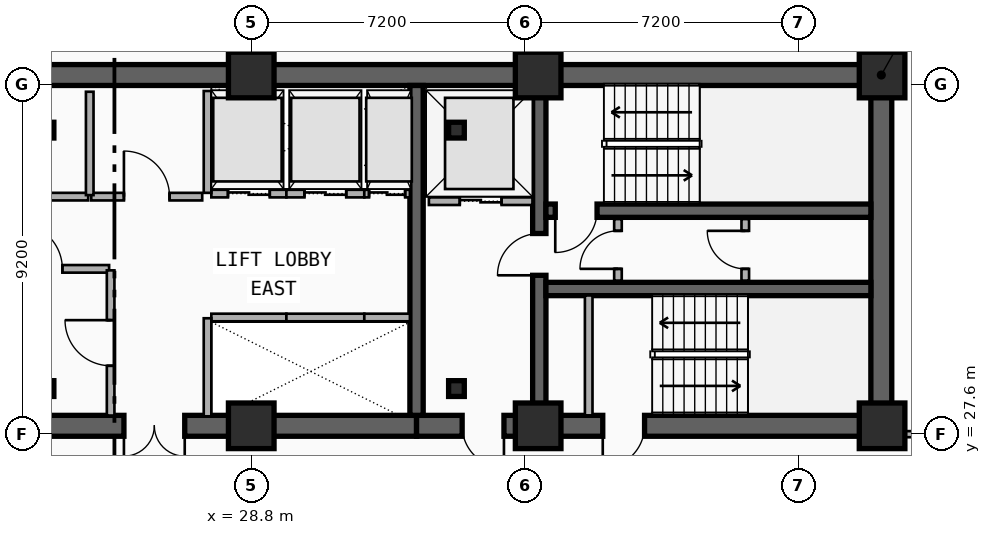
"""IFC4 building model, lengths in metres.
Left out: names, types, materials, properties, quantities, classifications, styles, units other than length and angle.
Written with IfcOpenShell. Run it as: python <this file> out.ifc"""

import sys

from ifc_helpers import new_model, si_unit, direction, frame, frame_2d, origin, origin_2d, place, context, subcontext, project, spatial, rectangle, i_section, extrude, element, fill, save


model = new_model("IFC4")
c1 = context("Model", 3, precision=1e-05, world=origin(), true_north=direction((0.0, 1.0)))
c2 = subcontext(c1, "Body", "Model", "MODEL_VIEW")
j1 = project(units=[si_unit("LENGTHUNIT", "METRE"), si_unit("PLANEANGLEUNIT", "RADIAN")], contexts=[c1])
p1 = place(None, origin())
s1 = spatial("IfcSite", under=j1, at=p1, CompositionType="ELEMENT")
p2 = place(p1, origin())
s2 = spatial("IfcBuilding", under=s1, at=p2, CompositionType="ELEMENT")
p3 = place(p2, frame((0.0, 0.0, 148.35)))
s3 = spatial("IfcBuildingStorey", under=s2, at=p3, CompositionType="ELEMENT", Elevation=148.35)
p4 = place(p3, frame((12.15, 37.05, 0.0), z_axis=(0.0, 0.0, 1.0), x_axis=(1.0, 0.0, 0.0)))
e1 = element("IfcWall", 1, at=p4, inside=s3, PredefinedType="SHEAR", context=c2, shape_type="SweptSolid", body=[
    extrude(rectangle(XDim=33.23, YDim=0.55, at=frame_2d((16.615, 0.0))), origin(), (0.0, 0.0, 1.0), 3.55),
])
p5 = place(p3, frame((33.15, 27.82, 0.0), z_axis=(0.0, 0.0, 1.0), x_axis=(-1.0, 0.0, 0.0)))
e2 = element("IfcWall", 2, at=p5, inside=s3, PredefinedType="SHEAR", context=c2, shape_type="SweptSolid", body=[
    extrude(rectangle(XDim=11.97, YDim=0.55, at=frame_2d((5.985, 0.0))), origin(), (0.0, 0.0, 1.0), 3.55),
])
p6 = place(p5, frame((6.1, 0.0, 0.0)))
e3 = element("IfcOpeningElement", 3, at=p6, cuts=e2, PredefinedType="OPENING", context=c2, shape_type="SweptSolid", body=[
    extrude(rectangle(XDim=1.6, YDim=2.2, at=frame_2d((0.8, 1.1))), frame((0.0, 0.285, 0.0), z_axis=(0.0, -1.0, 0.0), x_axis=(1.0, 0.0, 0.0)), (0.0, 0.0, 1.0), 0.57),
])
p7 = place(p3, frame((45.38, 27.82, 0.0), z_axis=(0.0, 0.0, 1.0), x_axis=(-1.0, 0.0, 0.0)))
e4 = element("IfcWall", 4, at=p7, inside=s3, PredefinedType="SHEAR", context=c2, shape_type="SweptSolid", body=[
    extrude(rectangle(XDim=12.23, YDim=0.55, at=frame_2d((6.115, 0.0))), origin(), (0.0, 0.0, 1.0), 3.55),
])
p8 = place(p7, frame((9.93, 0.0, 0.0)))
e5 = element("IfcOpeningElement", 5, at=p8, cuts=e4, PredefinedType="OPENING", context=c2, shape_type="SweptSolid", body=[
    extrude(rectangle(XDim=1.1, YDim=2.15, at=frame_2d((0.55, 1.075))), frame((0.0, 0.285, 0.0), z_axis=(0.0, -1.0, 0.0), x_axis=(1.0, 0.0, 0.0)), (0.0, 0.0, 1.0), 0.57),
])
p9 = place(p7, frame((6.23, 0.0, 0.0)))
e6 = element("IfcOpeningElement", 6, at=p9, cuts=e4, PredefinedType="OPENING", context=c2, shape_type="SweptSolid", body=[
    extrude(rectangle(XDim=1.1, YDim=2.15, at=frame_2d((0.55, 1.075))), frame((0.0, 0.285, 0.0), z_axis=(0.0, -1.0, 0.0), x_axis=(1.0, 0.0, 0.0)), (0.0, 0.0, 1.0), 0.57),
])
p10 = place(p3, frame((45.38, 28.095, 0.0), z_axis=(0.0, 0.0, 1.0), x_axis=(0.0, 1.0, 0.0)))
e7 = element("IfcWall", 7, at=p10, inside=s3, PredefinedType="SHEAR", context=c2, shape_type="SweptSolid", body=[
    extrude(rectangle(XDim=8.68, YDim=0.55, at=frame_2d((4.34, 0.0))), origin(), (0.0, 0.0, 1.0), 3.55),
])
p11 = place(p3, frame((33.15, 28.095, 0.0), z_axis=(0.0, 0.0, 1.0), x_axis=(0.0, 1.0, 0.0)))
e8 = element("IfcWall", 8, at=p11, inside=s3, PredefinedType="SHEAR", context=c2, shape_type="SweptSolid", body=[
    extrude(rectangle(XDim=8.68, YDim=0.35, at=frame_2d((4.34, 0.0))), origin(), (0.0, 0.0, 1.0), 3.55),
])
p12 = place(p3, frame((36.38, 28.095, 0.0), z_axis=(0.0, 0.0, 1.0), x_axis=(0.0, 1.0, 0.0)))
e9 = element("IfcWall", 9, at=p12, inside=s3, PredefinedType="SHEAR", context=c2, shape_type="SweptSolid", body=[
    extrude(rectangle(XDim=8.68, YDim=0.35, at=frame_2d((4.34, 0.0))), origin(), (0.0, 0.0, 1.0), 3.55),
])
p13 = place(p12, frame((3.685, 0.0, 0.0)))
e10 = element("IfcOpeningElement", 10, at=p13, cuts=e9, PredefinedType="OPENING", context=c2, shape_type="SweptSolid", body=[
    extrude(rectangle(XDim=1.1, YDim=2.15, at=frame_2d((0.55, 1.075))), frame((0.0, 0.185, 0.0), z_axis=(0.0, -1.0, 0.0), x_axis=(1.0, 0.0, 0.0)), (0.0, 0.0, 1.0), 0.37),
])
p14 = place(p3, frame((45.105, 33.48, 0.0), z_axis=(0.0, 0.0, 1.0), x_axis=(-1.0, 0.0, 0.0)))
e11 = element("IfcWall", 11, at=p14, inside=s3, PredefinedType="SHEAR", context=c2, shape_type="SweptSolid", body=[
    extrude(rectangle(XDim=8.55, YDim=0.35, at=frame_2d((4.275, 0.0))), origin(), (0.0, 0.0, 1.0), 3.55),
])
p15 = place(p14, frame((7.205, 0.0, 0.0)))
e12 = element("IfcOpeningElement", 12, at=p15, cuts=e11, PredefinedType="OPENING", context=c2, shape_type="SweptSolid", body=[
    extrude(rectangle(XDim=1.1, YDim=2.15, at=frame_2d((0.55, 1.075))), frame((0.0, 0.185, 0.0), z_axis=(0.0, -1.0, 0.0), x_axis=(1.0, 0.0, 0.0)), (0.0, 0.0, 1.0), 0.37),
])
p16 = place(p3, frame((36.555, 31.42, 0.0), z_axis=(0.0, 0.0, 1.0), x_axis=(1.0, 0.0, 0.0)))
e13 = element("IfcWall", 13, at=p16, inside=s3, PredefinedType="SHEAR", context=c2, shape_type="SweptSolid", body=[
    extrude(rectangle(XDim=8.55, YDim=0.35, at=frame_2d((4.275, 0.0))), origin(), (0.0, 0.0, 1.0), 3.55),
])
for number, where, z_axis, x_axis in (
    (14, (23.4, 28.8, 0.0), (0.0, 0.0, 1.0), (1.0, 0.0, 0.0)),
    (15, (34.2, 28.8, 0.0), (0.0, 0.0, 1.0), (1.0, 0.0, 0.0)),
    (16, (34.2, 35.6, 0.0), (0.0, 0.0, 1.0), (1.0, 0.0, 0.0)),
    (17, (23.4, 35.6, 0.0), (0.0, 0.0, 1.0), (1.0, 0.0, 0.0)),
):
    element("IfcColumn", number, at=place(p3, frame(where, z_axis=z_axis, x_axis=x_axis)), inside=s3, PredefinedType="COLUMN", context=c2, shape_type="SweptSolid", body=[
        extrude(i_section(OverallWidth=0.413, OverallDepth=0.415, WebThickness=0.03, FlangeThickness=0.047, FilletRadius=0.015, at=origin_2d()), origin(), (0.0, 0.0, 1.0), 3.55),
    ])
for number, where, z_axis, x_axis in (
    (18, (28.8, 27.82, 0.0), (0.0, 0.0, 1.0), (1.0, 0.0, 0.0)),
    (19, (28.8, 37.05, 0.0), (0.0, 0.0, 1.0), (1.0, 0.0, 0.0)),
    (20, (36.35, 27.82, 0.0), (0.0, 0.0, 1.0), (1.0, 0.0, 0.0)),
    (21, (36.35, 37.05, 0.0), (0.0, 0.0, 1.0), (1.0, 0.0, 0.0)),
    (22, (45.4, 27.82, 0.0), (0.0, 0.0, 1.0), (1.0, 0.0, 0.0)),
    (23, (45.4, 37.05, 0.0), (0.0, 0.0, 1.0), (1.0, 0.0, 0.0)),
):
    element("IfcColumn", number, at=place(p3, frame(where, z_axis=z_axis, x_axis=x_axis)), inside=s3, PredefinedType="COLUMN", context=c2, shape_type="SweptSolid", body=[
        extrude(rectangle(XDim=1.2, YDim=1.2, at=origin_2d()), origin(), (0.0, 0.0, 1.0), 3.55),
    ])
p17 = place(p3, frame((33.475, 33.73, 0.0), z_axis=(0.0, 0.0, 1.0), x_axis=(1.0, 0.0, 0.0)))
e24 = element("IfcWall", 24, at=p17, inside=s3, PredefinedType="PARTITIONING", context=c2, shape_type="SweptSolid", body=[
    extrude(rectangle(XDim=2.725, YDim=0.2, at=frame_2d((1.362, 0.0))), origin(), (0.0, 0.0, 1.0), 2.36),
])
p18 = place(p17, frame((0.812, 0.0, 0.0)))
e25 = element("IfcOpeningElement", 25, at=p18, cuts=e24, PredefinedType="OPENING", context=c2, shape_type="SweptSolid", body=[
    extrude(rectangle(XDim=1.1, YDim=2.15, at=frame_2d((0.55, 1.075))), frame((0.0, 0.11, 0.0), z_axis=(0.0, -1.0, 0.0), x_axis=(1.0, 0.0, 0.0)), (0.0, 0.0, 1.0), 0.22),
])
p19 = place(p3, frame((27.75, 30.67, 0.0), z_axis=(0.0, 0.0, 1.0), x_axis=(1.0, 0.0, 0.0)))
e26 = element("IfcWall", 26, at=p19, inside=s3, PredefinedType="PARTITIONING", context=c2, shape_type="SweptSolid", body=[
    extrude(rectangle(XDim=1.975, YDim=0.2, at=frame_2d((0.988, 0.0))), origin(), (0.0, 0.0, 1.0), 2.36),
])
p20 = place(p3, frame((27.65, 28.07, 0.0), z_axis=(0.0, 0.0, 1.0), x_axis=(0.0, 1.0, 0.0)))
e27 = element("IfcWall", 27, at=p20, inside=s3, PredefinedType="PARTITIONING", context=c2, shape_type="SweptSolid", body=[
    extrude(rectangle(XDim=2.58, YDim=0.2, at=frame_2d((1.29, 0.0))), origin(), (0.0, 0.0, 1.0), 2.36),
])
p21 = place(p3, frame((29.725, 30.67, 0.0), z_axis=(0.0, 0.0, 1.0), x_axis=(1.0, 0.0, 0.0)))
e28 = element("IfcWall", 28, at=p21, inside=s3, PredefinedType="PARTITIONING", context=c2, shape_type="SweptSolid", body=[
    extrude(rectangle(XDim=2.05, YDim=0.2, at=frame_2d((1.025, 0.0))), origin(), (0.0, 0.0, 1.0), 2.67),
])
p22 = place(p3, frame((31.775, 30.67, 0.0), z_axis=(0.0, 0.0, 1.0), x_axis=(1.0, 0.0, 0.0)))
e29 = element("IfcWall", 29, at=p22, inside=s3, PredefinedType="PARTITIONING", context=c2, shape_type="SweptSolid", body=[
    extrude(rectangle(XDim=1.2, YDim=0.2, at=frame_2d((0.6, 0.0))), origin(), (0.0, 0.0, 1.0), 2.67),
])
p23 = place(p3, frame((27.75, 33.93, 0.0), z_axis=(0.0, 0.0, 1.0), x_axis=(1.0, 0.0, 0.0)))
e30 = element("IfcWall", 30, at=p23, inside=s3, PredefinedType="PARTITIONING", context=c2, shape_type="SweptSolid", body=[
    extrude(rectangle(XDim=1.975, YDim=0.2, at=frame_2d((0.988, 0.0))), origin(), (0.0, 0.0, 1.0), 2.36),
])
p24 = place(p23, frame((0.438, 0.0, 0.0)))
e31 = element("IfcOpeningElement", 31, at=p24, cuts=e30, PredefinedType="OPENING", context=c2, shape_type="SweptSolid", body=[
    extrude(rectangle(XDim=1.1, YDim=2.15, at=frame_2d((0.55, 1.075))), frame((0.0, 0.11, 0.0), z_axis=(0.0, -1.0, 0.0), x_axis=(1.0, 0.0, 0.0)), (0.0, 0.0, 1.0), 0.22),
])
p25 = place(p3, frame((27.65, 33.95, 0.0), z_axis=(0.0, 0.0, 1.0), x_axis=(0.0, 1.0, 0.0)))
e32 = element("IfcWall", 32, at=p25, inside=s3, PredefinedType="PARTITIONING", context=c2, shape_type="SweptSolid", body=[
    extrude(rectangle(XDim=2.68, YDim=0.2, at=frame_2d((1.34, 0.0))), origin(), (0.0, 0.0, 1.0), 2.36),
])
p26 = place(p3, frame((29.725, 33.93, 0.0), z_axis=(0.0, 0.0, 1.0), x_axis=(1.0, 0.0, 0.0)))
e33 = element("IfcWall", 33, at=p26, inside=s3, PredefinedType="PARTITIONING", context=c2, shape_type="SweptSolid", body=[
    extrude(rectangle(XDim=2.05, YDim=0.2, at=frame_2d((1.025, 0.0))), origin(), (0.0, 0.0, 1.0), 3.29),
])
p27 = place(p26, frame((0.475, 0.0, 0.0)))
e34 = element("IfcOpeningElement", 34, at=p27, cuts=e33, PredefinedType="OPENING", context=c2, shape_type="SweptSolid", body=[
    extrude(rectangle(XDim=1.1, YDim=2.15, at=frame_2d((0.55, 1.075))), frame((0.0, 0.11, 0.0), z_axis=(0.0, -1.0, 0.0), x_axis=(1.0, 0.0, 0.0)), (0.0, 0.0, 1.0), 0.22),
])
p28 = place(p3, frame((31.775, 33.93, 0.0), z_axis=(0.0, 0.0, 1.0), x_axis=(1.0, 0.0, 0.0)))
e35 = element("IfcWall", 35, at=p28, inside=s3, PredefinedType="PARTITIONING", context=c2, shape_type="SweptSolid", body=[
    extrude(rectangle(XDim=1.2, YDim=0.2, at=frame_2d((0.6, 0.0))), origin(), (0.0, 0.0, 1.0), 3.29),
])
p29 = place(p28, frame((0.125, 0.0, 0.0)))
e36 = element("IfcOpeningElement", 36, at=p29, cuts=e35, PredefinedType="OPENING", context=c2, shape_type="SweptSolid", body=[
    extrude(rectangle(XDim=0.95, YDim=2.15, at=frame_2d((0.475, 1.075))), frame((0.0, 0.11, 0.0), z_axis=(0.0, -1.0, 0.0), x_axis=(1.0, 0.0, 0.0)), (0.0, 0.0, 1.0), 0.22),
])
p30 = place(p3, frame((37.68, 28.095, 0.0), z_axis=(0.0, 0.0, 1.0), x_axis=(0.0, 1.0, 0.0)))
e37 = element("IfcWall", 37, at=p30, inside=s3, PredefinedType="PARTITIONING", context=c2, shape_type="SweptSolid", body=[
    extrude(rectangle(XDim=3.155, YDim=0.2, at=frame_2d((1.578, 0.0))), origin(), (0.0, 0.0, 1.0), 2.67),
])
p31 = place(p3, frame((38.45, 31.64, 0.0), z_axis=(0.0, 0.0, 1.0), x_axis=(0.0, 1.0, 0.0)))
e38 = element("IfcWall", 38, at=p31, inside=s3, PredefinedType="PARTITIONING", context=c2, shape_type="SweptSolid", body=[
    extrude(rectangle(XDim=1.62, YDim=0.2, at=frame_2d((0.81, 0.0))), origin(), (0.0, 0.0, 1.0), 3.29),
])
p32 = place(p31, frame((0.31, 0.0, 0.0)))
e39 = element("IfcOpeningElement", 39, at=p32, cuts=e38, PredefinedType="OPENING", context=c2, shape_type="SweptSolid", body=[
    extrude(rectangle(XDim=1.0, YDim=2.15, at=frame_2d((0.5, 1.075))), frame((0.0, 0.11, 0.0), z_axis=(0.0, -1.0, 0.0), x_axis=(1.0, 0.0, 0.0)), (0.0, 0.0, 1.0), 0.22),
])
p33 = place(p3, frame((41.8, 31.64, 0.0), z_axis=(0.0, 0.0, 1.0), x_axis=(0.0, 1.0, 0.0)))
e40 = element("IfcWall", 40, at=p33, inside=s3, PredefinedType="PARTITIONING", context=c2, shape_type="SweptSolid", body=[
    extrude(rectangle(XDim=1.62, YDim=0.2, at=frame_2d((0.81, 0.0))), origin(), (0.0, 0.0, 1.0), 3.29),
])
p34 = place(p33, frame((0.31, 0.0, 0.0)))
e41 = element("IfcOpeningElement", 41, at=p34, cuts=e40, PredefinedType="OPENING", context=c2, shape_type="SweptSolid", body=[
    extrude(rectangle(XDim=1.0, YDim=2.15, at=frame_2d((0.5, 1.075))), frame((0.0, 0.11, 0.0), z_axis=(0.0, -1.0, 0.0), x_axis=(1.0, 0.0, 0.0)), (0.0, 0.0, 1.0), 0.22),
])
p35 = place(p3, frame((21.4, 31.95, 0.0), z_axis=(0.0, 0.0, 1.0), x_axis=(1.0, 0.0, 0.0)))
e42 = element("IfcWall", 42, at=p35, inside=s3, PredefinedType="PARTITIONING", context=c2, shape_type="SweptSolid", body=[
    extrude(rectangle(XDim=3.66, YDim=0.2, at=frame_2d((1.83, 0.0))), origin(), (0.0, 0.0, 1.0), 2.36),
])
p36 = place(p35, frame((1.23, 0.0, 0.0)))
e43 = element("IfcOpeningElement", 43, at=p36, cuts=e42, PredefinedType="OPENING", context=c2, shape_type="SweptSolid", body=[
    extrude(rectangle(XDim=1.2, YDim=2.15, at=frame_2d((0.6, 1.075))), frame((0.0, 0.11, 0.0), z_axis=(0.0, -1.0, 0.0), x_axis=(1.0, 0.0, 0.0)), (0.0, 0.0, 1.0), 0.22),
])
p37 = place(p3, frame((24.51, 33.85, 0.0), z_axis=(0.0, 0.0, 1.0), x_axis=(-1.0, 0.0, 0.0)))
e44 = element("IfcWall", 44, at=p37, inside=s3, PredefinedType="PARTITIONING", context=c2, shape_type="SweptSolid", body=[
    extrude(rectangle(XDim=2.92, YDim=0.2, at=frame_2d((1.46, 0.0))), origin(), (0.0, 0.0, 1.0), 2.36),
])
p38 = place(p37, frame((1.52, 0.0, 0.0)))
e45 = element("IfcOpeningElement", 45, at=p38, cuts=e44, PredefinedType="OPENING", context=c2, shape_type="SweptSolid", body=[
    extrude(rectangle(XDim=1.2, YDim=2.15, at=frame_2d((0.6, 1.075))), frame((0.0, 0.11, 0.0), z_axis=(0.0, -1.0, 0.0), x_axis=(1.0, 0.0, 0.0)), (0.0, 0.0, 1.0), 0.22),
])
p39 = place(p3, frame((24.59, 33.85, 0.0), z_axis=(0.0, 0.0, 1.0), x_axis=(1.0, 0.0, 0.0)))
e46 = element("IfcWall", 46, at=p39, inside=s3, PredefinedType="PARTITIONING", context=c2, shape_type="SweptSolid", body=[
    extrude(rectangle(XDim=2.92, YDim=0.2, at=frame_2d((1.46, 0.0))), origin(), (0.0, 0.0, 1.0), 3.29),
])
p40 = place(p39, frame((0.86, 0.0, 0.0)))
e47 = element("IfcOpeningElement", 47, at=p40, cuts=e46, PredefinedType="OPENING", context=c2, shape_type="SweptSolid", body=[
    extrude(rectangle(XDim=1.2, YDim=2.15, at=frame_2d((0.6, 1.075))), frame((0.0, 0.11, 0.0), z_axis=(0.0, -1.0, 0.0), x_axis=(1.0, 0.0, 0.0)), (0.0, 0.0, 1.0), 0.22),
])
p41 = place(p3, frame((25.1, 28.09, 0.0), z_axis=(0.0, 0.0, 1.0), x_axis=(0.0, 1.0, 0.0)))
e48 = element("IfcWall", 48, at=p41, inside=s3, PredefinedType="PARTITIONING", context=c2, shape_type="SweptSolid", body=[
    extrude(rectangle(XDim=3.82, YDim=0.2, at=frame_2d((1.91, 0.0))), origin(), (0.0, 0.0, 1.0), 2.67),
])
p42 = place(p41, frame((1.31, 0.0, 0.0)))
e49 = element("IfcOpeningElement", 49, at=p42, cuts=e48, PredefinedType="OPENING", context=c2, shape_type="SweptSolid", body=[
    extrude(rectangle(XDim=1.2, YDim=2.15, at=frame_2d((0.6, 1.075))), frame((0.0, 0.11, 0.0), z_axis=(0.0, -1.0, 0.0), x_axis=(1.0, 0.0, 0.0)), (0.0, 0.0, 1.0), 0.22),
])
p43 = place(p3, frame((24.55, 33.89, 0.0), z_axis=(0.0, 0.0, 1.0), x_axis=(0.0, 1.0, 0.0)))
e50 = element("IfcWall", 50, at=p43, inside=s3, PredefinedType="PARTITIONING", context=c2, shape_type="SweptSolid", body=[
    extrude(rectangle(XDim=2.72, YDim=0.2, at=frame_2d((1.36, 0.0))), origin(), (0.0, 0.0, 1.0), 3.29),
])
p44 = place(p3, frame((45.41, 27.6, 0.0), z_axis=(0.0, 0.0, 1.0), x_axis=(1.0, 0.0, 0.0)))
e51 = element("IfcWall", 51, at=p44, inside=s3, PredefinedType="PARTITIONING", context=c2, shape_type="SweptSolid", body=[
    extrude(rectangle(XDim=0.91, YDim=0.16, at=frame_2d((0.455, 0.0))), origin(), (0.0, 0.0, 1.0), 2.36),
])
p45 = place(p18, origin())
e52 = element("IfcDoor", 52, at=p45, inside=s3, OperationType="DOUBLE_DOOR_SLIDING", PredefinedType="DOOR", context=c2, shape_type="SweptSolid", body=[
    extrude(rectangle(XDim=1.1, YDim=2.15, at=frame_2d((0.55, 1.075))), frame((0.0, 0.025, 0.0), z_axis=(0.0, -1.0, 0.0), x_axis=(1.0, 0.0, 0.0)), (0.0, 0.0, 1.0), 0.05),
])
fill(e25, e52)
p46 = place(p24, origin())
e53 = element("IfcDoor", 53, at=p46, inside=s3, OperationType="DOUBLE_DOOR_SLIDING", PredefinedType="DOOR", context=c2, shape_type="SweptSolid", body=[
    extrude(rectangle(XDim=1.1, YDim=2.15, at=frame_2d((0.55, 1.075))), frame((0.0, 0.025, 0.0), z_axis=(0.0, -1.0, 0.0), x_axis=(1.0, 0.0, 0.0)), (0.0, 0.0, 1.0), 0.05),
])
fill(e31, e53)
p47 = place(p27, origin())
e54 = element("IfcDoor", 54, at=p47, inside=s3, OperationType="DOUBLE_DOOR_SLIDING", PredefinedType="DOOR", context=c2, shape_type="SweptSolid", body=[
    extrude(rectangle(XDim=1.1, YDim=2.15, at=frame_2d((0.55, 1.075))), frame((0.0, 0.025, 0.0), z_axis=(0.0, -1.0, 0.0), x_axis=(1.0, 0.0, 0.0)), (0.0, 0.0, 1.0), 0.05),
])
fill(e34, e54)
p48 = place(p29, origin())
e55 = element("IfcDoor", 55, at=p48, inside=s3, OperationType="DOUBLE_DOOR_SLIDING", PredefinedType="DOOR", context=c2, shape_type="SweptSolid", body=[
    extrude(rectangle(XDim=0.95, YDim=2.15, at=frame_2d((0.475, 1.075))), frame((0.0, 0.025, 0.0), z_axis=(0.0, -1.0, 0.0), x_axis=(1.0, 0.0, 0.0)), (0.0, 0.0, 1.0), 0.05),
])
fill(e36, e55)
p49 = place(p15, origin())
e56 = element("IfcDoor", 56, at=p49, inside=s3, OperationType="SINGLE_SWING_RIGHT", PredefinedType="DOOR", context=c2, shape_type="SweptSolid", body=[
    extrude(rectangle(XDim=1.1, YDim=2.15, at=frame_2d((0.55, 1.075))), frame((0.0, 0.025, 0.0), z_axis=(0.0, -1.0, 0.0), x_axis=(1.0, 0.0, 0.0)), (0.0, 0.0, 1.0), 0.05),
])
fill(e12, e56)
p50 = place(p13, origin())
e57 = element("IfcDoor", 57, at=p50, inside=s3, OperationType="SINGLE_SWING_LEFT", PredefinedType="DOOR", context=c2, shape_type="SweptSolid", body=[
    extrude(rectangle(XDim=1.1, YDim=2.15, at=frame_2d((0.55, 1.075))), frame((0.0, 0.025, 0.0), z_axis=(0.0, -1.0, 0.0), x_axis=(1.0, 0.0, 0.0)), (0.0, 0.0, 1.0), 0.05),
])
fill(e10, e57)
p51 = place(p8, origin())
e58 = element("IfcDoor", 58, at=p51, inside=s3, OperationType="SINGLE_SWING_LEFT", PredefinedType="DOOR", context=c2, shape_type="SweptSolid", body=[
    extrude(rectangle(XDim=1.1, YDim=2.15, at=frame_2d((0.55, 1.075))), frame((0.0, 0.025, 0.0), z_axis=(0.0, -1.0, 0.0), x_axis=(1.0, 0.0, 0.0)), (0.0, 0.0, 1.0), 0.05),
])
fill(e5, e58)
p52 = place(p9, origin())
e59 = element("IfcDoor", 59, at=p52, inside=s3, OperationType="SINGLE_SWING_RIGHT", PredefinedType="DOOR", context=c2, shape_type="SweptSolid", body=[
    extrude(rectangle(XDim=1.1, YDim=2.15, at=frame_2d((0.55, 1.075))), frame((0.0, 0.025, 0.0), z_axis=(0.0, -1.0, 0.0), x_axis=(1.0, 0.0, 0.0)), (0.0, 0.0, 1.0), 0.05),
])
fill(e6, e59)
p53 = place(p6, origin())
e60 = element("IfcDoor", 60, at=p53, inside=s3, OperationType="SINGLE_SWING_LEFT", PredefinedType="DOOR", context=c2, shape_type="SweptSolid", body=[
    extrude(rectangle(XDim=1.6, YDim=2.2, at=frame_2d((0.8, 1.1))), frame((0.0, 0.025, 0.0), z_axis=(0.0, -1.0, 0.0), x_axis=(1.0, 0.0, 0.0)), (0.0, 0.0, 1.0), 0.05),
])
fill(e3, e60)
p54 = place(p32, origin())
e61 = element("IfcDoor", 61, at=p54, inside=s3, OperationType="SINGLE_SWING_LEFT", PredefinedType="DOOR", context=c2, shape_type="SweptSolid", body=[
    extrude(rectangle(XDim=1.0, YDim=2.15, at=frame_2d((0.5, 1.075))), frame((0.0, 0.025, 0.0), z_axis=(0.0, -1.0, 0.0), x_axis=(1.0, 0.0, 0.0)), (0.0, 0.0, 1.0), 0.05),
])
fill(e39, e61)
p55 = place(p34, origin())
e62 = element("IfcDoor", 62, at=p55, inside=s3, OperationType="SINGLE_SWING_RIGHT", PredefinedType="DOOR", context=c2, shape_type="SweptSolid", body=[
    extrude(rectangle(XDim=1.0, YDim=2.15, at=frame_2d((0.5, 1.075))), frame((0.0, 0.025, 0.0), z_axis=(0.0, -1.0, 0.0), x_axis=(1.0, 0.0, 0.0)), (0.0, 0.0, 1.0), 0.05),
])
fill(e41, e62)
p56 = place(p36, origin())
e63 = element("IfcDoor", 63, at=p56, inside=s3, OperationType="SINGLE_SWING_LEFT", PredefinedType="DOOR", context=c2, shape_type="SweptSolid", body=[
    extrude(rectangle(XDim=1.2, YDim=2.15, at=frame_2d((0.6, 1.075))), frame((0.0, 0.025, 0.0), z_axis=(0.0, -1.0, 0.0), x_axis=(1.0, 0.0, 0.0)), (0.0, 0.0, 1.0), 0.05),
])
fill(e43, e63)
p57 = place(p40, origin())
e64 = element("IfcDoor", 64, at=p57, inside=s3, OperationType="SINGLE_SWING_LEFT", PredefinedType="DOOR", context=c2, shape_type="SweptSolid", body=[
    extrude(rectangle(XDim=1.2, YDim=2.15, at=frame_2d((0.6, 1.075))), frame((0.0, 0.025, 0.0), z_axis=(0.0, -1.0, 0.0), x_axis=(1.0, 0.0, 0.0)), (0.0, 0.0, 1.0), 0.05),
])
fill(e47, e64)
p58 = place(p42, origin())
e65 = element("IfcDoor", 65, at=p58, inside=s3, OperationType="SINGLE_SWING_RIGHT", PredefinedType="DOOR", context=c2, shape_type="SweptSolid", body=[
    extrude(rectangle(XDim=1.2, YDim=2.15, at=frame_2d((0.6, 1.075))), frame((0.0, 0.025, 0.0), z_axis=(0.0, -1.0, 0.0), x_axis=(1.0, 0.0, 0.0)), (0.0, 0.0, 1.0), 0.05),
])
fill(e49, e65)
save(model, sys.argv[1])
